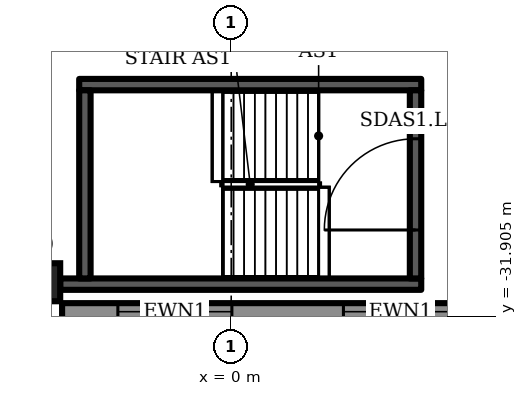
"""IFC4 building model, lengths in metres.
Left out: names, types, materials, properties, quantities, classifications, styles, units other than length and angle.
Written with IfcOpenShell. Run it as: python <this file> out.ifc"""

import sys

from ifc_helpers import new_model, si_unit, direction, frame, frame_2d, origin, origin_2d, place, context, subcontext, project, spatial, rectangle, extrude, element, fill, save


model = new_model("IFC4")
c1 = context("Model", 3, precision=1e-05, world=origin(), true_north=direction((0.0, 1.0)))
c2 = subcontext(c1, "Body", "Model", "MODEL_VIEW")
j1 = project(units=[si_unit("LENGTHUNIT", "METRE"), si_unit("PLANEANGLEUNIT", "RADIAN")], contexts=[c1])
p1 = place(None, origin())
s1 = spatial("IfcSite", under=j1, at=p1, CompositionType="ELEMENT")
p2 = place(p1, origin())
s2 = spatial("IfcBuilding", under=s1, at=p2, CompositionType="ELEMENT")
p3 = place(p2, frame((0.0, 0.0, 8.0)))
s3 = spatial("IfcBuildingStorey", under=s2, at=p3, CompositionType="ELEMENT", Elevation=8.0)
p4 = place(p3, frame((-5.0, -31.0, 0.0), z_axis=(0.0, 0.0, 1.0), x_axis=(1.0, 0.0, 0.0)))
e1 = element("IfcColumn", 1, at=p4, inside=s3, PredefinedType="COLUMN", context=c2, shape_type="SweptSolid", body=[
    extrude(rectangle(XDim=1.0, YDim=1.0, at=origin_2d()), origin(), (0.0, 0.0, 1.0), 7.0),
])
p5 = place(p3, frame((-4.45, -31.775, 0.0), z_axis=(0.0, 0.0, 1.0), x_axis=(1.0, 0.0, 0.0)))
e2 = element("IfcWall", 2, at=p5, inside=s3, PredefinedType="SOLIDWALL", context=c2, shape_type="SweptSolid", body=[
    extrude(rectangle(XDim=100.9, YDim=0.45, at=frame_2d((50.45, 0.0))), origin(), (0.0, 0.0, 1.0), 6.7),
])
p6 = place(p5, frame((1.468, 0.0, 1.0)))
e3 = element("IfcOpeningElement", 3, at=p6, cuts=e2, PredefinedType="OPENING", context=c2, shape_type="SweptSolid", body=[
    extrude(rectangle(XDim=3.0, YDim=4.7, at=frame_2d((1.5, 2.35))), frame((0.0, 0.235, 0.0), z_axis=(0.0, -1.0, 0.0), x_axis=(1.0, 0.0, 0.0)), (0.0, 0.0, 1.0), 0.47),
])
p7 = place(p5, frame((7.403, 0.0, 1.0)))
e4 = element("IfcOpeningElement", 4, at=p7, cuts=e2, PredefinedType="OPENING", context=c2, shape_type="SweptSolid", body=[
    extrude(rectangle(XDim=3.0, YDim=4.7, at=frame_2d((1.5, 2.35))), frame((0.0, 0.235, 0.0), z_axis=(0.0, -1.0, 0.0), x_axis=(1.0, 0.0, 0.0)), (0.0, 0.0, 1.0), 0.47),
])
p8 = place(p5, frame((13.338, 0.0, 1.0)))
e5 = element("IfcOpeningElement", 5, at=p8, cuts=e2, PredefinedType="OPENING", context=c2, shape_type="SweptSolid", body=[
    extrude(rectangle(XDim=3.0, YDim=4.7, at=frame_2d((1.5, 2.35))), frame((0.0, 0.235, 0.0), z_axis=(0.0, -1.0, 0.0), x_axis=(1.0, 0.0, 0.0)), (0.0, 0.0, 1.0), 0.47),
])
p9 = place(p5, frame((19.273, 0.0, 1.0)))
e6 = element("IfcOpeningElement", 6, at=p9, cuts=e2, PredefinedType="OPENING", context=c2, shape_type="SweptSolid", body=[
    extrude(rectangle(XDim=3.0, YDim=4.7, at=frame_2d((1.5, 2.35))), frame((0.0, 0.235, 0.0), z_axis=(0.0, -1.0, 0.0), x_axis=(1.0, 0.0, 0.0)), (0.0, 0.0, 1.0), 0.47),
])
p10 = place(p5, frame((25.209, 0.0, 1.0)))
e7 = element("IfcOpeningElement", 7, at=p10, cuts=e2, PredefinedType="OPENING", context=c2, shape_type="SweptSolid", body=[
    extrude(rectangle(XDim=3.0, YDim=4.7, at=frame_2d((1.5, 2.35))), frame((0.0, 0.235, 0.0), z_axis=(0.0, -1.0, 0.0), x_axis=(1.0, 0.0, 0.0)), (0.0, 0.0, 1.0), 0.47),
])
p11 = place(p5, frame((31.144, 0.0, 1.0)))
e8 = element("IfcOpeningElement", 8, at=p11, cuts=e2, PredefinedType="OPENING", context=c2, shape_type="SweptSolid", body=[
    extrude(rectangle(XDim=3.0, YDim=4.7, at=frame_2d((1.5, 2.35))), frame((0.0, 0.235, 0.0), z_axis=(0.0, -1.0, 0.0), x_axis=(1.0, 0.0, 0.0)), (0.0, 0.0, 1.0), 0.47),
])
p12 = place(p5, frame((37.079, 0.0, 1.0)))
e9 = element("IfcOpeningElement", 9, at=p12, cuts=e2, PredefinedType="OPENING", context=c2, shape_type="SweptSolid", body=[
    extrude(rectangle(XDim=3.0, YDim=4.7, at=frame_2d((1.5, 2.35))), frame((0.0, 0.235, 0.0), z_axis=(0.0, -1.0, 0.0), x_axis=(1.0, 0.0, 0.0)), (0.0, 0.0, 1.0), 0.47),
])
p13 = place(p5, frame((43.015, 0.0, 1.0)))
e10 = element("IfcOpeningElement", 10, at=p13, cuts=e2, PredefinedType="OPENING", context=c2, shape_type="SweptSolid", body=[
    extrude(rectangle(XDim=3.0, YDim=4.7, at=frame_2d((1.5, 2.35))), frame((0.0, 0.235, 0.0), z_axis=(0.0, -1.0, 0.0), x_axis=(1.0, 0.0, 0.0)), (0.0, 0.0, 1.0), 0.47),
])
p14 = place(p5, frame((48.95, 0.0, 1.0)))
e11 = element("IfcOpeningElement", 11, at=p14, cuts=e2, PredefinedType="OPENING", context=c2, shape_type="SweptSolid", body=[
    extrude(rectangle(XDim=3.0, YDim=4.7, at=frame_2d((1.5, 2.35))), frame((0.0, 0.235, 0.0), z_axis=(0.0, -1.0, 0.0), x_axis=(1.0, 0.0, 0.0)), (0.0, 0.0, 1.0), 0.47),
])
p15 = place(p5, frame((54.885, 0.0, 1.0)))
e12 = element("IfcOpeningElement", 12, at=p15, cuts=e2, PredefinedType="OPENING", context=c2, shape_type="SweptSolid", body=[
    extrude(rectangle(XDim=3.0, YDim=4.7, at=frame_2d((1.5, 2.35))), frame((0.0, 0.235, 0.0), z_axis=(0.0, -1.0, 0.0), x_axis=(1.0, 0.0, 0.0)), (0.0, 0.0, 1.0), 0.47),
])
p16 = place(p5, frame((60.821, 0.0, 1.0)))
e13 = element("IfcOpeningElement", 13, at=p16, cuts=e2, PredefinedType="OPENING", context=c2, shape_type="SweptSolid", body=[
    extrude(rectangle(XDim=3.0, YDim=4.7, at=frame_2d((1.5, 2.35))), frame((0.0, 0.235, 0.0), z_axis=(0.0, -1.0, 0.0), x_axis=(1.0, 0.0, 0.0)), (0.0, 0.0, 1.0), 0.47),
])
p17 = place(p5, frame((66.756, 0.0, 1.0)))
e14 = element("IfcOpeningElement", 14, at=p17, cuts=e2, PredefinedType="OPENING", context=c2, shape_type="SweptSolid", body=[
    extrude(rectangle(XDim=3.0, YDim=4.7, at=frame_2d((1.5, 2.35))), frame((0.0, 0.235, 0.0), z_axis=(0.0, -1.0, 0.0), x_axis=(1.0, 0.0, 0.0)), (0.0, 0.0, 1.0), 0.47),
])
p18 = place(p5, frame((72.691, 0.0, 1.0)))
e15 = element("IfcOpeningElement", 15, at=p18, cuts=e2, PredefinedType="OPENING", context=c2, shape_type="SweptSolid", body=[
    extrude(rectangle(XDim=3.0, YDim=4.7, at=frame_2d((1.5, 2.35))), frame((0.0, 0.235, 0.0), z_axis=(0.0, -1.0, 0.0), x_axis=(1.0, 0.0, 0.0)), (0.0, 0.0, 1.0), 0.47),
])
p19 = place(p5, frame((78.626, 0.0, 1.0)))
e16 = element("IfcOpeningElement", 16, at=p19, cuts=e2, PredefinedType="OPENING", context=c2, shape_type="SweptSolid", body=[
    extrude(rectangle(XDim=3.0, YDim=4.7, at=frame_2d((1.5, 2.35))), frame((0.0, 0.235, 0.0), z_axis=(0.0, -1.0, 0.0), x_axis=(1.0, 0.0, 0.0)), (0.0, 0.0, 1.0), 0.47),
])
p20 = place(p5, frame((84.562, 0.0, 1.0)))
e17 = element("IfcOpeningElement", 17, at=p20, cuts=e2, PredefinedType="OPENING", context=c2, shape_type="SweptSolid", body=[
    extrude(rectangle(XDim=3.0, YDim=4.7, at=frame_2d((1.5, 2.35))), frame((0.0, 0.235, 0.0), z_axis=(0.0, -1.0, 0.0), x_axis=(1.0, 0.0, 0.0)), (0.0, 0.0, 1.0), 0.47),
])
p21 = place(p5, frame((90.497, 0.0, 1.0)))
e18 = element("IfcOpeningElement", 18, at=p21, cuts=e2, PredefinedType="OPENING", context=c2, shape_type="SweptSolid", body=[
    extrude(rectangle(XDim=3.0, YDim=4.7, at=frame_2d((1.5, 2.35))), frame((0.0, 0.235, 0.0), z_axis=(0.0, -1.0, 0.0), x_axis=(1.0, 0.0, 0.0)), (0.0, 0.0, 1.0), 0.47),
])
p22 = place(p5, frame((96.432, 0.0, 1.0)))
e19 = element("IfcOpeningElement", 19, at=p22, cuts=e2, PredefinedType="OPENING", context=c2, shape_type="SweptSolid", body=[
    extrude(rectangle(XDim=3.0, YDim=4.7, at=frame_2d((1.5, 2.35))), frame((0.0, 0.235, 0.0), z_axis=(0.0, -1.0, 0.0), x_axis=(1.0, 0.0, 0.0)), (0.0, 0.0, 1.0), 0.47),
])
p23 = place(p3, frame((-4.5, -31.05, 0.0), z_axis=(0.0, 0.0, 1.0), x_axis=(1.0, 0.0, 0.0)))
e20 = element("IfcWall", 20, at=p23, inside=s3, PredefinedType="SHEAR", context=c2, shape_type="SweptSolid", body=[
    extrude(rectangle(XDim=9.5, YDim=0.3, at=frame_2d((4.75, 0.0))), origin(), (0.0, 0.0, 1.0), 6.7),
])
p24 = place(p3, frame((-4.0, -25.8, 0.0), z_axis=(0.0, 0.0, 1.0), x_axis=(1.0, 0.0, 0.0)))
e21 = element("IfcWall", 21, at=p24, inside=s3, PredefinedType="SHEAR", context=c2, shape_type="SweptSolid", body=[
    extrude(rectangle(XDim=9.0, YDim=0.3, at=frame_2d((4.5, 0.0))), origin(), (0.0, 0.0, 1.0), 6.7),
])
p25 = place(p3, frame((-3.85, -30.9, 0.0), z_axis=(0.0, 0.0, 1.0), x_axis=(0.0, 1.0, 0.0)))
e22 = element("IfcWall", 22, at=p25, inside=s3, PredefinedType="SHEAR", context=c2, shape_type="SweptSolid", body=[
    extrude(rectangle(XDim=4.95, YDim=0.3, at=frame_2d((2.475, 0.0))), origin(), (0.0, 0.0, 1.0), 6.7),
])
p26 = place(p3, frame((4.85, -30.9, 0.0), z_axis=(0.0, 0.0, 1.0), x_axis=(0.0, 1.0, 0.0)))
e23 = element("IfcWall", 23, at=p26, inside=s3, PredefinedType="SHEAR", context=c2, shape_type="SweptSolid", body=[
    extrude(rectangle(XDim=4.95, YDim=0.3, at=frame_2d((2.475, 0.0))), origin(), (0.0, 0.0, 1.0), 6.7),
])
p27 = place(p26, frame((1.275, 0.0, 0.0)))
e24 = element("IfcOpeningElement", 24, at=p27, cuts=e23, PredefinedType="OPENING", context=c2, shape_type="SweptSolid", body=[
    extrude(rectangle(XDim=2.4, YDim=2.1, at=frame_2d((1.2, 1.05))), frame((0.0, 0.16, 0.0), z_axis=(0.0, -1.0, 0.0), x_axis=(1.0, 0.0, 0.0)), (0.0, 0.0, 1.0), 0.32),
])
p28 = place(p6, origin())
e25 = element("IfcWindow", 25, at=p28, inside=s3, PartitioningType="SINGLE_PANEL", PredefinedType="WINDOW", context=c2, shape_type="SweptSolid", body=[
    extrude(rectangle(XDim=3.0, YDim=4.7, at=frame_2d((1.5, 2.35))), frame((0.0, 0.105, 0.0), z_axis=(0.0, -1.0, 0.0), x_axis=(1.0, 0.0, 0.0)), (0.0, 0.0, 1.0), 0.06),
])
fill(e3, e25)
p29 = place(p7, origin())
e26 = element("IfcWindow", 26, at=p29, inside=s3, PartitioningType="SINGLE_PANEL", PredefinedType="WINDOW", context=c2, shape_type="SweptSolid", body=[
    extrude(rectangle(XDim=3.0, YDim=4.7, at=frame_2d((1.5, 2.35))), frame((0.0, 0.105, 0.0), z_axis=(0.0, -1.0, 0.0), x_axis=(1.0, 0.0, 0.0)), (0.0, 0.0, 1.0), 0.06),
])
fill(e4, e26)
p30 = place(p27, origin())
e27 = element("IfcDoor", 27, at=p30, inside=s3, OperationType="DOUBLE_DOOR_SINGLE_SWING", PredefinedType="DOOR", context=c2, shape_type="SweptSolid", body=[
    extrude(rectangle(XDim=2.4, YDim=2.1, at=frame_2d((1.2, 1.05))), frame((0.0, 0.025, 0.0), z_axis=(0.0, -1.0, 0.0), x_axis=(1.0, 0.0, 0.0)), (0.0, 0.0, 1.0), 0.05),
])
fill(e24, e27)
save(model, sys.argv[1])
